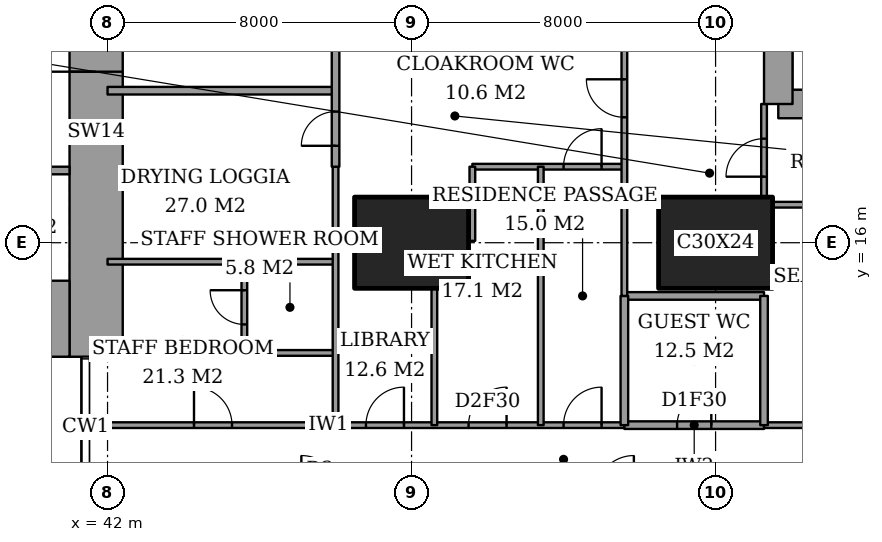
"""IFC4 building model, lengths in metres.
Left out: names, types, materials, properties, quantities, classifications, styles, units other than length and angle.
Written with IfcOpenShell. Run it as: python <this file> out.ifc"""

import sys

from ifc_helpers import new_model, si_unit, direction, frame, frame_2d, origin, origin_2d, place, context, subcontext, project, spatial, rectangle, extrude, element, fill, save


model = new_model("IFC4")
c1 = context("Model", 3, precision=1e-05, world=origin(), true_north=direction((0.0, 1.0)))
c2 = subcontext(c1, "Body", "Model", "MODEL_VIEW")
j1 = project(units=[si_unit("LENGTHUNIT", "METRE"), si_unit("PLANEANGLEUNIT", "RADIAN")], contexts=[c1])
p1 = place(None, origin())
s1 = spatial("IfcSite", under=j1, at=p1, CompositionType="ELEMENT")
p2 = place(p1, origin())
s2 = spatial("IfcBuilding", under=s1, at=p2, CompositionType="ELEMENT")
p3 = place(p2, frame((0.0, 0.0, 252.0)))
s3 = spatial("IfcBuildingStorey", under=s2, at=p3, CompositionType="ELEMENT", Elevation=252.0)
for number, where, z_axis, x_axis in (
    (1, (50.0, 16.0, 0.0), (0.0, 0.0, 1.0), (1.0, 0.0, 0.0)),
    (2, (58.0, 16.0, 0.0), (0.0, 0.0, 1.0), (1.0, 0.0, 0.0)),
):
    element("IfcColumn", number, at=place(p3, frame(where, z_axis=z_axis, x_axis=x_axis)), inside=s3, PredefinedType="COLUMN", context=c2, shape_type="SweptSolid", body=[
        extrude(rectangle(XDim=3.0, YDim=2.4, at=origin_2d()), origin(), (0.0, 0.0, 1.0), 3.6),
    ])
p4 = place(p3, frame((37.85, 14.0, 0.0), z_axis=(0.0, 0.0, 1.0), x_axis=(1.0, 0.0, 0.0)))
e3 = element("IfcWall", 3, at=p4, inside=s3, PredefinedType="SHEAR", context=c2, shape_type="SweptSolid", body=[
    extrude(rectangle(XDim=3.15, YDim=2.0, at=frame_2d((1.575, 0.0))), origin(), (0.0, 0.0, 1.0), 3.6),
])
p5 = place(p3, frame((41.7, 13.0, 0.0), z_axis=(0.0, 0.0, 1.0), x_axis=(0.0, 1.0, 0.0)))
e4 = element("IfcWall", 4, at=p5, inside=s3, PredefinedType="SHEAR", context=c2, shape_type="SweptSolid", body=[
    extrude(rectangle(XDim=11.85, YDim=1.4, at=frame_2d((5.925, 0.0))), origin(), (0.0, 0.0, 1.0), 3.6),
])
p6 = place(p5, frame((7.5, 0.0, 0.0)))
e5 = element("IfcOpeningElement", 5, at=p6, cuts=e4, PredefinedType="OPENING", context=c2, shape_type="SweptSolid", body=[
    extrude(rectangle(XDim=1.8, YDim=2.4, at=frame_2d((0.9, 1.2))), frame((0.0, 0.71, 0.0), z_axis=(0.0, -1.0, 0.0), x_axis=(1.0, 0.0, 0.0)), (0.0, 0.0, 1.0), 1.42),
])
p7 = place(p3, frame((59.65, 19.65, 0.0), z_axis=(0.0, 0.0, 1.0), x_axis=(1.0, 0.0, 0.0)))
e6 = element("IfcWall", 6, at=p7, inside=s3, PredefinedType="SHEAR", context=c2, shape_type="SweptSolid", body=[
    extrude(rectangle(XDim=4.45, YDim=0.75, at=frame_2d((2.225, 0.0))), origin(), (0.0, 0.0, 1.0), 3.6),
])
p8 = place(p3, frame((59.65, 28.35, 0.0), z_axis=(0.0, 0.0, 1.0), x_axis=(0.0, -1.0, 0.0)))
e7 = element("IfcWall", 7, at=p8, inside=s3, PredefinedType="SHEAR", context=c2, shape_type="SweptSolid", body=[
    extrude(rectangle(XDim=8.7, YDim=0.75, at=frame_2d((4.35, 0.0))), origin(), (0.0, 0.0, 1.0), 3.6),
])
p9 = place(p8, frame((0.975, 0.0, 0.0)))
e8 = element("IfcOpeningElement", 8, at=p9, cuts=e7, PredefinedType="OPENING", context=c2, shape_type="SweptSolid", body=[
    extrude(rectangle(XDim=1.0, YDim=2.1, at=frame_2d((0.5, 1.05))), frame((0.0, 0.385, 0.0), z_axis=(0.0, -1.0, 0.0), x_axis=(1.0, 0.0, 0.0)), (0.0, 0.0, 1.0), 0.77),
])
p10 = place(p3, frame((55.6, 11.2, 0.0), z_axis=(0.0, 0.0, 1.0), x_axis=(1.0, 0.0, 0.0)))
e9 = element("IfcWall", 9, at=p10, inside=s3, PredefinedType="PARTITIONING", context=c2, shape_type="SweptSolid", body=[
    extrude(rectangle(XDim=3.675, YDim=0.2, at=frame_2d((1.837, 0.0))), origin(), (0.0, 0.0, 1.0), 3.35),
])
p11 = place(p10, frame((1.387, 0.0, 0.0)))
e10 = element("IfcOpeningElement", 10, at=p11, cuts=e9, PredefinedType="OPENING", context=c2, shape_type="SweptSolid", body=[
    extrude(rectangle(XDim=0.9, YDim=2.1, at=frame_2d((0.45, 1.05))), frame((0.0, 0.11, 0.0), z_axis=(0.0, -1.0, 0.0), x_axis=(1.0, 0.0, 0.0)), (0.0, 0.0, 1.0), 0.22),
])
p12 = place(p3, frame((41.439, 11.2, 0.0), z_axis=(0.0, 0.0, 1.0), x_axis=(1.0, 0.0, 0.0)))
e11 = element("IfcWall", 11, at=p12, inside=s3, PredefinedType="PARTITIONING", context=c2, shape_type="SweptSolid", body=[
    extrude(rectangle(XDim=14.161, YDim=0.15, at=frame_2d((7.081, 0.0))), origin(), (0.0, 0.0, 1.0), 3.35),
])
p13 = place(p12, frame((12.561, 0.0, 0.0)))
e12 = element("IfcOpeningElement", 12, at=p13, cuts=e11, PredefinedType="OPENING", context=c2, shape_type="SweptSolid", body=[
    extrude(rectangle(XDim=1.0, YDim=2.1, at=frame_2d((0.5, 1.05))), frame((0.0, 0.085, 0.0), z_axis=(0.0, -1.0, 0.0), x_axis=(1.0, 0.0, 0.0)), (0.0, 0.0, 1.0), 0.17),
])
p14 = place(p12, frame((10.061, 0.0, 0.0)))
e13 = element("IfcOpeningElement", 13, at=p14, cuts=e11, PredefinedType="OPENING", context=c2, shape_type="SweptSolid", body=[
    extrude(rectangle(XDim=1.0, YDim=2.1, at=frame_2d((0.5, 1.05))), frame((0.0, 0.085, 0.0), z_axis=(0.0, -1.0, 0.0), x_axis=(1.0, 0.0, 0.0)), (0.0, 0.0, 1.0), 0.17),
])
p15 = place(p12, frame((7.361, 0.0, 0.0)))
e14 = element("IfcOpeningElement", 14, at=p15, cuts=e11, PredefinedType="OPENING", context=c2, shape_type="SweptSolid", body=[
    extrude(rectangle(XDim=1.0, YDim=2.1, at=frame_2d((0.5, 1.05))), frame((0.0, 0.085, 0.0), z_axis=(0.0, -1.0, 0.0), x_axis=(1.0, 0.0, 0.0)), (0.0, 0.0, 1.0), 0.17),
])
p16 = place(p12, frame((2.836, 0.0, 0.0)))
e15 = element("IfcOpeningElement", 15, at=p16, cuts=e11, PredefinedType="OPENING", context=c2, shape_type="SweptSolid", body=[
    extrude(rectangle(XDim=1.0, YDim=2.1, at=frame_2d((0.5, 1.05))), frame((0.0, 0.085, 0.0), z_axis=(0.0, -1.0, 0.0), x_axis=(1.0, 0.0, 0.0)), (0.0, 0.0, 1.0), 0.17),
])
p17 = place(p3, frame((59.275, 11.2, 0.0), z_axis=(0.0, 0.0, 1.0), x_axis=(1.0, 0.0, 0.0)))
e16 = element("IfcWall", 16, at=p17, inside=s3, PredefinedType="PARTITIONING", context=c2, shape_type="SweptSolid", body=[
    extrude(rectangle(XDim=7.175, YDim=0.15, at=frame_2d((3.587, 0.0))), origin(), (0.0, 0.0, 1.0), 3.35),
])
p18 = place(p17, frame((3.087, 0.0, 0.0)))
e17 = element("IfcOpeningElement", 17, at=p18, cuts=e16, PredefinedType="OPENING", context=c2, shape_type="SweptSolid", body=[
    extrude(rectangle(XDim=1.0, YDim=2.1, at=frame_2d((0.5, 1.05))), frame((0.0, 0.085, 0.0), z_axis=(0.0, -1.0, 0.0), x_axis=(1.0, 0.0, 0.0)), (0.0, 0.0, 1.0), 0.17),
])
p19 = place(p3, frame((45.6, 13.1, 0.0), z_axis=(0.0, 0.0, 1.0), x_axis=(1.0, 0.0, 0.0)))
e18 = element("IfcWall", 18, at=p19, inside=s3, PredefinedType="PARTITIONING", context=c2, shape_type="SweptSolid", body=[
    extrude(rectangle(XDim=2.4, YDim=0.15, at=frame_2d((1.2, 0.0))), origin(), (0.0, 0.0, 1.0), 3.35),
])
p20 = place(p3, frame((55.6, 14.6, 0.0), z_axis=(0.0, 0.0, 1.0), x_axis=(1.0, 0.0, 0.0)))
e19 = element("IfcWall", 19, at=p20, inside=s3, PredefinedType="PARTITIONING", context=c2, shape_type="SweptSolid", body=[
    extrude(rectangle(XDim=3.675, YDim=0.2, at=frame_2d((1.837, 0.0))), origin(), (0.0, 0.0, 1.0), 3.35),
])
p21 = place(p3, frame((42.0, 15.5, 0.0), z_axis=(0.0, 0.0, 1.0), x_axis=(1.0, 0.0, 0.0)))
e20 = element("IfcWall", 20, at=p21, inside=s3, PredefinedType="PARTITIONING", context=c2, shape_type="SweptSolid", body=[
    extrude(rectangle(XDim=6.0, YDim=0.15, at=frame_2d((3.0, 0.0))), origin(), (0.0, 0.0, 1.0), 3.35),
])
p22 = place(p3, frame((48.0, 16.05, 0.0), z_axis=(0.0, 0.0, 1.0), x_axis=(1.0, 0.0, 0.0)))
e21 = element("IfcWall", 21, at=p22, inside=s3, PredefinedType="PARTITIONING", context=c2, shape_type="SweptSolid", body=[
    extrude(rectangle(XDim=0.5, YDim=0.15, at=frame_2d((0.25, 0.0))), origin(), (0.0, 0.0, 1.0), 2.634),
])
p23 = place(p3, frame((59.5, 17.0, 0.0), z_axis=(0.0, 0.0, 1.0), x_axis=(1.0, 0.0, 0.0)))
e22 = element("IfcWall", 22, at=p23, inside=s3, PredefinedType="PARTITIONING", context=c2, shape_type="SweptSolid", body=[
    extrude(rectangle(XDim=6.95, YDim=0.15, at=frame_2d((3.475, 0.0))), origin(), (0.0, 0.0, 1.0), 3.35),
])
p24 = place(p3, frame((51.6, 18.0, 0.0), z_axis=(0.0, 0.0, 1.0), x_axis=(1.0, 0.0, 0.0)))
e23 = element("IfcWall", 23, at=p24, inside=s3, PredefinedType="PARTITIONING", context=c2, shape_type="SweptSolid", body=[
    extrude(rectangle(XDim=4.0, YDim=0.15, at=frame_2d((2.0, 0.0))), origin(), (0.0, 0.0, 1.0), 3.35),
])
p25 = place(p24, frame((2.4, 0.0, 0.0)))
e24 = element("IfcOpeningElement", 24, at=p25, cuts=e23, PredefinedType="OPENING", context=c2, shape_type="SweptSolid", body=[
    extrude(rectangle(XDim=1.0, YDim=2.1, at=frame_2d((0.5, 1.05))), frame((0.0, 0.085, 0.0), z_axis=(0.0, -1.0, 0.0), x_axis=(1.0, 0.0, 0.0)), (0.0, 0.0, 1.0), 0.17),
])
p26 = place(p3, frame((42.0, 20.0, 0.0), z_axis=(0.0, 0.0, 1.0), x_axis=(1.0, 0.0, 0.0)))
e25 = element("IfcWall", 25, at=p26, inside=s3, PredefinedType="PARTITIONING", context=c2, shape_type="SweptSolid", body=[
    extrude(rectangle(XDim=6.0, YDim=0.2, at=frame_2d((3.0, 0.0))), origin(), (0.0, 0.0, 1.0), 3.35),
])
p27 = place(p3, frame((45.6, 13.1, 0.0), z_axis=(0.0, 0.0, 1.0), x_axis=(0.0, 1.0, 0.0)))
e26 = element("IfcWall", 26, at=p27, inside=s3, PredefinedType="PARTITIONING", context=c2, shape_type="SweptSolid", body=[
    extrude(rectangle(XDim=2.4, YDim=0.15, at=frame_2d((1.2, 0.0))), origin(), (0.0, 0.0, 1.0), 3.35),
])
p28 = place(p27, frame((0.75, 0.0, 0.0)))
e27 = element("IfcOpeningElement", 27, at=p28, cuts=e26, PredefinedType="OPENING", context=c2, shape_type="SweptSolid", body=[
    extrude(rectangle(XDim=0.9, YDim=2.1, at=frame_2d((0.45, 1.05))), frame((0.0, 0.085, 0.0), z_axis=(0.0, -1.0, 0.0), x_axis=(1.0, 0.0, 0.0)), (0.0, 0.0, 1.0), 0.17),
])
p29 = place(p3, frame((48.0, 18.0, 0.0), z_axis=(0.0, 0.0, 1.0), x_axis=(0.0, 1.0, 0.0)))
e28 = element("IfcWall", 28, at=p29, inside=s3, PredefinedType="PARTITIONING", context=c2, shape_type="SweptSolid", body=[
    extrude(rectangle(XDim=6.0, YDim=0.2, at=frame_2d((3.0, 0.0))), origin(), (0.0, 0.0, 1.0), 3.35),
])
p30 = place(p29, frame((3.4, 0.0, 0.0)))
e29 = element("IfcOpeningElement", 29, at=p30, cuts=e28, PredefinedType="OPENING", context=c2, shape_type="SweptSolid", body=[
    extrude(rectangle(XDim=1.2, YDim=2.4, at=frame_2d((0.6, 1.2))), frame((0.0, 0.11, 0.0), z_axis=(0.0, -1.0, 0.0), x_axis=(1.0, 0.0, 0.0)), (0.0, 0.0, 1.0), 0.22),
])
p31 = place(p29, frame((0.55, 0.0, 0.0)))
e30 = element("IfcOpeningElement", 30, at=p31, cuts=e28, PredefinedType="OPENING", context=c2, shape_type="SweptSolid", body=[
    extrude(rectangle(XDim=0.9, YDim=2.1, at=frame_2d((0.45, 1.05))), frame((0.0, 0.11, 0.0), z_axis=(0.0, -1.0, 0.0), x_axis=(1.0, 0.0, 0.0)), (0.0, 0.0, 1.0), 0.22),
])
p32 = place(p3, frame((48.0, 11.2, 0.0), z_axis=(0.0, 0.0, 1.0), x_axis=(0.0, 1.0, 0.0)))
e31 = element("IfcWall", 31, at=p32, inside=s3, PredefinedType="PARTITIONING", context=c2, shape_type="SweptSolid", body=[
    extrude(rectangle(XDim=6.8, YDim=0.15, at=frame_2d((3.4, 0.0))), origin(), (0.0, 0.0, 1.0), 3.35),
])
p33 = place(p3, frame((50.6, 11.2, 0.0), z_axis=(0.0, 0.0, 1.0), x_axis=(0.0, 1.0, 0.0)))
e32 = element("IfcWall", 32, at=p33, inside=s3, PredefinedType="PARTITIONING", context=c2, shape_type="SweptSolid", body=[
    extrude(rectangle(XDim=3.6, YDim=0.15, at=frame_2d((1.8, 0.0))), origin(), (0.0, 0.0, 1.0), 3.35),
])
p34 = place(p3, frame((51.6, 16.05, 0.0), z_axis=(0.0, 0.0, 1.0), x_axis=(0.0, 1.0, 0.0)))
e33 = element("IfcWall", 33, at=p34, inside=s3, PredefinedType="PARTITIONING", context=c2, shape_type="SweptSolid", body=[
    extrude(rectangle(XDim=1.95, YDim=0.15, at=frame_2d((0.975, 0.0))), origin(), (0.0, 0.0, 1.0), 3.35),
])
p35 = place(p3, frame((53.4, 11.2, 0.0), z_axis=(0.0, 0.0, 1.0), x_axis=(0.0, 1.0, 0.0)))
e34 = element("IfcWall", 34, at=p35, inside=s3, PredefinedType="PARTITIONING", context=c2, shape_type="SweptSolid", body=[
    extrude(rectangle(XDim=6.8, YDim=0.15, at=frame_2d((3.4, 0.0))), origin(), (0.0, 0.0, 1.0), 3.35),
])
p36 = place(p3, frame((55.6, 11.2, 0.0), z_axis=(0.0, 0.0, 1.0), x_axis=(0.0, 1.0, 0.0)))
e35 = element("IfcWall", 35, at=p36, inside=s3, PredefinedType="PARTITIONING", context=c2, shape_type="SweptSolid", body=[
    extrude(rectangle(XDim=3.4, YDim=0.2, at=frame_2d((1.7, 0.0))), origin(), (0.0, 0.0, 1.0), 3.35),
])
p37 = place(p3, frame((55.6, 14.6, 0.0), z_axis=(0.0, 0.0, 1.0), x_axis=(0.0, 1.0, 0.0)))
e36 = element("IfcWall", 36, at=p37, inside=s3, PredefinedType="PARTITIONING", context=c2, shape_type="SweptSolid", body=[
    extrude(rectangle(XDim=7.0, YDim=0.15, at=frame_2d((3.5, 0.0))), origin(), (0.0, 0.0, 1.0), 3.35),
])
p38 = place(p37, frame((4.7, 0.0, 0.0)))
e37 = element("IfcOpeningElement", 37, at=p38, cuts=e36, PredefinedType="OPENING", context=c2, shape_type="SweptSolid", body=[
    extrude(rectangle(XDim=1.0, YDim=2.1, at=frame_2d((0.5, 1.05))), frame((0.0, 0.085, 0.0), z_axis=(0.0, -1.0, 0.0), x_axis=(1.0, 0.0, 0.0)), (0.0, 0.0, 1.0), 0.17),
])
p39 = place(p3, frame((59.275, 11.2, 0.0), z_axis=(0.0, 0.0, 1.0), x_axis=(0.0, 1.0, 0.0)))
e38 = element("IfcWall", 38, at=p39, inside=s3, PredefinedType="PARTITIONING", context=c2, shape_type="SweptSolid", body=[
    extrude(rectangle(XDim=3.4, YDim=0.2, at=frame_2d((1.7, 0.0))), origin(), (0.0, 0.0, 1.0), 3.35),
])
p40 = place(p3, frame((59.275, 17.2, 0.0), z_axis=(0.0, 0.0, 1.0), x_axis=(0.0, 1.0, 0.0)))
e39 = element("IfcWall", 39, at=p40, inside=s3, PredefinedType="PARTITIONING", context=c2, shape_type="SweptSolid", body=[
    extrude(rectangle(XDim=2.45, YDim=0.15, at=frame_2d((1.225, 0.0))), origin(), (0.0, 0.0, 1.0), 3.35),
])
p41 = place(p40, frame((0.538, 0.0, 0.0)))
e40 = element("IfcOpeningElement", 40, at=p41, cuts=e39, PredefinedType="OPENING", context=c2, shape_type="SweptSolid", body=[
    extrude(rectangle(XDim=1.0, YDim=2.1, at=frame_2d((0.5, 1.05))), frame((0.0, 0.085, 0.0), z_axis=(0.0, -1.0, 0.0), x_axis=(1.0, 0.0, 0.0)), (0.0, 0.0, 1.0), 0.17),
])
p42 = place(p3, frame((28.3, 17.9, 0.0), z_axis=(0.0, 0.0, 1.0), x_axis=(1.0, 0.0, 0.0)))
e41 = element("IfcWall", 41, at=p42, inside=s3, PredefinedType="PARTITIONING", context=c2, shape_type="SweptSolid", body=[
    extrude(rectangle(XDim=12.7, YDim=0.2, at=frame_2d((6.35, 0.0))), origin(), (0.0, 0.0, 1.0), 3.6),
])
p43 = place(p42, frame((1.05, 0.0, 0.0)))
e42 = element("IfcOpeningElement", 42, at=p43, cuts=e41, PredefinedType="OPENING", context=c2, shape_type="SweptSolid", body=[
    extrude(rectangle(XDim=0.9, YDim=2.1, at=frame_2d((0.45, 1.05))), frame((0.0, 0.11, 0.0), z_axis=(0.0, -1.0, 0.0), x_axis=(1.0, 0.0, 0.0)), (0.0, 0.0, 1.0), 0.22),
])
p44 = place(p42, frame((4.2, 0.0, 0.0)))
e43 = element("IfcOpeningElement", 43, at=p44, cuts=e41, PredefinedType="OPENING", context=c2, shape_type="SweptSolid", body=[
    extrude(rectangle(XDim=1.0, YDim=2.1, at=frame_2d((0.5, 1.05))), frame((0.0, 0.11, 0.0), z_axis=(0.0, -1.0, 0.0), x_axis=(1.0, 0.0, 0.0)), (0.0, 0.0, 1.0), 0.22),
])
p45 = place(p42, frame((10.6, 0.0, 0.0)))
e44 = element("IfcOpeningElement", 44, at=p45, cuts=e41, PredefinedType="OPENING", context=c2, shape_type="SweptSolid", body=[
    extrude(rectangle(XDim=1.2, YDim=2.1, at=frame_2d((0.6, 1.05))), frame((0.0, 0.11, 0.0), z_axis=(0.0, -1.0, 0.0), x_axis=(1.0, 0.0, 0.0)), (0.0, 0.0, 1.0), 0.22),
])
p46 = place(p13, origin())
e45 = element("IfcDoor", 45, at=p46, inside=s3, OperationType="SINGLE_SWING_LEFT", PredefinedType="DOOR", context=c2, shape_type="SweptSolid", body=[
    extrude(rectangle(XDim=1.0, YDim=2.1, at=frame_2d((0.5, 1.05))), frame((0.0, 0.025, 0.0), z_axis=(0.0, -1.0, 0.0), x_axis=(1.0, 0.0, 0.0)), (0.0, 0.0, 1.0), 0.05),
])
fill(e12, e45)
p47 = place(p41, origin())
e46 = element("IfcDoor", 46, at=p47, inside=s3, OperationType="SINGLE_SWING_RIGHT", PredefinedType="DOOR", context=c2, shape_type="SweptSolid", body=[
    extrude(rectangle(XDim=1.0, YDim=2.1, at=frame_2d((0.5, 1.05))), frame((0.0, 0.025, 0.0), z_axis=(0.0, -1.0, 0.0), x_axis=(1.0, 0.0, 0.0)), (0.0, 0.0, 1.0), 0.05),
])
fill(e40, e46)
p48 = place(p11, origin())
e47 = element("IfcDoor", 47, at=p48, inside=s3, OperationType="SINGLE_SWING_LEFT", PredefinedType="DOOR", context=c2, shape_type="SweptSolid", body=[
    extrude(rectangle(XDim=0.9, YDim=2.1, at=frame_2d((0.45, 1.05))), frame((0.0, 0.025, 0.0), z_axis=(0.0, -1.0, 0.0), x_axis=(1.0, 0.0, 0.0)), (0.0, 0.0, 1.0), 0.05),
])
fill(e10, e47)
p49 = place(p38, origin())
e48 = element("IfcDoor", 48, at=p49, inside=s3, OperationType="SINGLE_SWING_LEFT", PredefinedType="DOOR", context=c2, shape_type="SweptSolid", body=[
    extrude(rectangle(XDim=1.0, YDim=2.1, at=frame_2d((0.5, 1.05))), frame((0.0, 0.025, 0.0), z_axis=(0.0, -1.0, 0.0), x_axis=(1.0, 0.0, 0.0)), (0.0, 0.0, 1.0), 0.05),
])
fill(e37, e48)
p50 = place(p25, origin())
e49 = element("IfcDoor", 49, at=p50, inside=s3, OperationType="SINGLE_SWING_LEFT", PredefinedType="DOOR", context=c2, shape_type="SweptSolid", body=[
    extrude(rectangle(XDim=1.0, YDim=2.1, at=frame_2d((0.5, 1.05))), frame((0.0, 0.025, 0.0), z_axis=(0.0, -1.0, 0.0), x_axis=(1.0, 0.0, 0.0)), (0.0, 0.0, 1.0), 0.05),
])
fill(e24, e49)
p51 = place(p14, origin())
e50 = element("IfcDoor", 50, at=p51, inside=s3, OperationType="SINGLE_SWING_LEFT", PredefinedType="DOOR", context=c2, shape_type="SweptSolid", body=[
    extrude(rectangle(XDim=1.0, YDim=2.1, at=frame_2d((0.5, 1.05))), frame((0.0, 0.025, 0.0), z_axis=(0.0, -1.0, 0.0), x_axis=(1.0, 0.0, 0.0)), (0.0, 0.0, 1.0), 0.05),
])
fill(e13, e50)
p52 = place(p15, origin())
e51 = element("IfcDoor", 51, at=p52, inside=s3, OperationType="SINGLE_SWING_LEFT", PredefinedType="DOOR", context=c2, shape_type="SweptSolid", body=[
    extrude(rectangle(XDim=1.0, YDim=2.1, at=frame_2d((0.5, 1.05))), frame((0.0, 0.025, 0.0), z_axis=(0.0, -1.0, 0.0), x_axis=(1.0, 0.0, 0.0)), (0.0, 0.0, 1.0), 0.05),
])
fill(e14, e51)
p53 = place(p28, origin())
e52 = element("IfcDoor", 52, at=p53, inside=s3, OperationType="SINGLE_SWING_LEFT", PredefinedType="DOOR", context=c2, shape_type="SweptSolid", body=[
    extrude(rectangle(XDim=0.9, YDim=2.1, at=frame_2d((0.45, 1.05))), frame((0.0, 0.025, 0.0), z_axis=(0.0, -1.0, 0.0), x_axis=(1.0, 0.0, 0.0)), (0.0, 0.0, 1.0), 0.05),
])
fill(e27, e52)
p54 = place(p16, origin())
e53 = element("IfcDoor", 53, at=p54, inside=s3, OperationType="SINGLE_SWING_RIGHT", PredefinedType="DOOR", context=c2, shape_type="SweptSolid", body=[
    extrude(rectangle(XDim=1.0, YDim=2.1, at=frame_2d((0.5, 1.05))), frame((0.0, 0.025, 0.0), z_axis=(0.0, -1.0, 0.0), x_axis=(1.0, 0.0, 0.0)), (0.0, 0.0, 1.0), 0.05),
])
fill(e15, e53)
p55 = place(p31, origin())
e54 = element("IfcDoor", 54, at=p55, inside=s3, OperationType="SINGLE_SWING_RIGHT", PredefinedType="DOOR", context=c2, shape_type="SweptSolid", body=[
    extrude(rectangle(XDim=0.9, YDim=2.1, at=frame_2d((0.45, 1.05))), frame((0.0, 0.025, 0.0), z_axis=(0.0, -1.0, 0.0), x_axis=(1.0, 0.0, 0.0)), (0.0, 0.0, 1.0), 0.05),
])
fill(e30, e54)
p56 = place(p6, origin())
e55 = element("IfcDoor", 55, at=p56, inside=s3, OperationType="DOUBLE_DOOR_DOUBLE_SWING", PredefinedType="DOOR", context=c2, shape_type="SweptSolid", body=[
    extrude(rectangle(XDim=1.8, YDim=2.4, at=frame_2d((0.9, 1.2))), frame((0.0, 0.025, 0.0), z_axis=(0.0, -1.0, 0.0), x_axis=(1.0, 0.0, 0.0)), (0.0, 0.0, 1.0), 0.05),
])
fill(e5, e55)
save(model, sys.argv[1])
